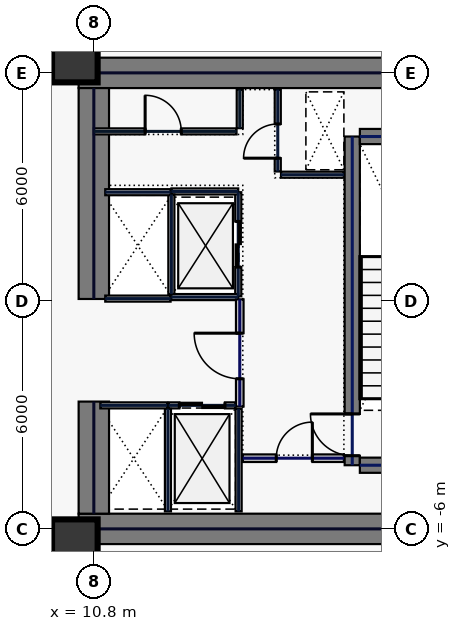
"""IFC4 building model, lengths in metres.
Left out: names, types, materials, properties, quantities, classifications, styles, units other than length and angle.
Written with IfcOpenShell. Run it as: python <this file> out.ifc"""

import sys

from ifc_helpers import new_model, si_unit, direction, frame, frame_2d, origin, origin_2d, place, context, subcontext, project, spatial, rectangle, hollow_rectangle, extrude, element, fill, save


model = new_model("IFC4")
c1 = context("Model", 3, precision=1e-05, world=origin(), true_north=direction((0.0, 1.0)))
c2 = subcontext(c1, "Body", "Model", "MODEL_VIEW")
j1 = project(units=[si_unit("LENGTHUNIT", "METRE"), si_unit("PLANEANGLEUNIT", "RADIAN")], contexts=[c1])
p1 = place(None, origin())
s1 = spatial("IfcSite", under=j1, at=p1, CompositionType="ELEMENT")
p2 = place(p1, origin())
s2 = spatial("IfcBuilding", under=s1, at=p2, CompositionType="ELEMENT")
p3 = place(p2, frame((0.0, 0.0, 51.4)))
s3 = spatial("IfcBuildingStorey", under=s2, at=p3, CompositionType="ELEMENT", Elevation=51.4)
for number, where, z_axis, x_axis in (
    (1, (10.4, 6.0, 0.0), (0.0, 0.0, 1.0), (1.0, 0.0, 0.0)),
    (2, (10.4, -6.0, 0.0), (0.0, 0.0, 1.0), (1.0, 0.0, 0.0)),
):
    element("IfcWall", number, at=place(p3, frame(where, z_axis=z_axis, x_axis=x_axis)), inside=s3, PredefinedType="SHEAR", context=c2, shape_type="SweptSolid", body=[
        extrude(rectangle(XDim=11.6, YDim=0.8, at=frame_2d((5.8, 0.0))), origin(), (0.0, 0.0, 1.0), 3.74),
    ])
p4 = place(p3, frame((10.8, -5.6, 0.0), z_axis=(0.0, 0.0, 1.0), x_axis=(0.0, 1.0, 0.0)))
e3 = element("IfcWall", 3, at=p4, inside=s3, PredefinedType="SHEAR", context=c2, shape_type="SweptSolid", body=[
    extrude(rectangle(XDim=2.95, YDim=0.8, at=frame_2d((1.475, 0.0))), origin(), (0.0, 0.0, 1.0), 3.74),
])
p5 = place(p3, frame((10.8, 0.05, 0.0), z_axis=(0.0, 0.0, 1.0), x_axis=(0.0, 1.0, 0.0)))
e4 = element("IfcWall", 4, at=p5, inside=s3, PredefinedType="SHEAR", context=c2, shape_type="SweptSolid", body=[
    extrude(rectangle(XDim=5.55, YDim=0.8, at=frame_2d((2.775, 0.0))), origin(), (0.0, 0.0, 1.0), 3.74),
])
p6 = place(p3, frame((17.6, -4.325, 0.0), z_axis=(0.0, 0.0, 1.0), x_axis=(0.0, 1.0, 0.0)))
e5 = element("IfcWall", 5, at=p6, inside=s3, PredefinedType="SHEAR", context=c2, shape_type="SweptSolid", body=[
    extrude(rectangle(XDim=8.65, YDim=0.4, at=frame_2d((4.325, 0.0))), origin(), (0.0, 0.0, 1.0), 3.74),
])
p7 = place(p6, frame((0.25, 0.0, 0.0)))
e6 = element("IfcOpeningElement", 6, at=p7, cuts=e5, PredefinedType="OPENING", context=c2, shape_type="SweptSolid", body=[
    extrude(rectangle(XDim=1.1, YDim=2.2, at=frame_2d((0.55, 1.1))), frame((0.0, 0.21, 0.0), z_axis=(0.0, -1.0, 0.0), x_axis=(1.0, 0.0, 0.0)), (0.0, 0.0, 1.0), 0.42),
])
for number, where, z_axis, x_axis in (
    (7, (17.8, -4.325, 0.0), (0.0, 0.0, 1.0), (1.0, 0.0, 0.0)),
    (8, (17.8, 4.325, 0.0), (0.0, 0.0, 1.0), (1.0, 0.0, 0.0)),
):
    element("IfcWall", number, at=place(p3, frame(where, z_axis=z_axis, x_axis=x_axis)), inside=s3, PredefinedType="SHEAR", context=c2, shape_type="SweptSolid", body=[
        extrude(rectangle(XDim=3.4, YDim=0.4, at=frame_2d((1.7, 0.0))), origin(), (0.0, 0.0, 1.0), 3.74),
    ])
for number, where, z_axis, x_axis in (
    (9, (10.3, -6.35, 0.0), (0.0, 0.0, 1.0), (1.0, 0.0, 0.0)),
    (10, (10.3, 6.35, 0.0), (0.0, 0.0, 1.0), (1.0, 0.0, 0.0)),
):
    element("IfcColumn", number, at=place(p3, frame(where, z_axis=z_axis, x_axis=x_axis)), inside=s3, PredefinedType="COLUMN", context=c2, shape_type="SweptSolid", body=[
        extrude(hollow_rectangle(XDim=1.2, YDim=1.2, WallThickness=0.05, at=origin_2d()), origin(), (0.0, 0.0, 1.0), 3.74),
    ])
p8 = place(p3, frame((14.6, 0.12, 0.0), z_axis=(0.0, 0.0, 1.0), x_axis=(0.0, 1.0, 0.0)))
e11 = element("IfcWall", 11, at=p8, inside=s3, PredefinedType="PARTITIONING", context=c2, shape_type="SweptSolid", body=[
    extrude(rectangle(XDim=2.74, YDim=0.16, at=frame_2d((1.37, 0.0))), origin(), (0.0, 0.0, 1.0), 3.74),
])
p9 = place(p8, frame((0.77, 0.0, 0.0)))
e12 = element("IfcOpeningElement", 12, at=p9, cuts=e11, PredefinedType="OPENING", context=c2, shape_type="SweptSolid", body=[
    extrude(rectangle(XDim=1.2, YDim=2.2, at=frame_2d((0.6, 1.1))), frame((0.0, 0.09, 0.0), z_axis=(0.0, -1.0, 0.0), x_axis=(1.0, 0.0, 0.0)), (0.0, 0.0, 1.0), 0.18),
])
for number, where, z_axis, x_axis in (
    (13, (12.84, 0.1, 0.0), (0.0, 0.0, 1.0), (1.0, 0.0, 0.0)),
    (14, (12.84, 2.88, 0.0), (0.0, 0.0, 1.0), (1.0, 0.0, 0.0)),
):
    element("IfcWall", number, at=place(p3, frame(where, z_axis=z_axis, x_axis=x_axis)), inside=s3, PredefinedType="PARTITIONING", context=c2, shape_type="SweptSolid", body=[
        extrude(rectangle(XDim=1.76, YDim=0.16, at=frame_2d((0.88, 0.0))), origin(), (0.0, 0.0, 1.0), 3.74),
    ])
p10 = place(p3, frame((12.84, 0.18, 0.0), z_axis=(0.0, 0.0, 1.0), x_axis=(0.0, 1.0, 0.0)))
e15 = element("IfcWall", 15, at=p10, inside=s3, PredefinedType="PARTITIONING", context=c2, shape_type="SweptSolid", body=[
    extrude(rectangle(XDim=2.62, YDim=0.16, at=frame_2d((1.31, 0.0))), origin(), (0.0, 0.0, 1.0), 3.74),
])
p11 = place(p3, frame((12.77, -2.75, 0.0), z_axis=(0.0, 0.0, 1.0), x_axis=(1.0, 0.0, 0.0)))
e16 = element("IfcWall", 16, at=p11, inside=s3, PredefinedType="PARTITIONING", context=c2, shape_type="SweptSolid", body=[
    extrude(rectangle(XDim=1.76, YDim=0.16, at=frame_2d((0.88, 0.0))), origin(), (0.0, 0.0, 1.0), 3.74),
])
p12 = place(p11, frame((0.28, 0.0, 0.0)))
e17 = element("IfcOpeningElement", 17, at=p12, cuts=e16, PredefinedType="OPENING", context=c2, shape_type="SweptSolid", body=[
    extrude(rectangle(XDim=1.2, YDim=2.2, at=frame_2d((0.6, 1.1))), frame((0.0, 0.09, 0.0), z_axis=(0.0, -1.0, 0.0), x_axis=(1.0, 0.0, 0.0)), (0.0, 0.0, 1.0), 0.18),
])
for number, where, z_axis, x_axis in (
    (18, (12.75, -5.54, 0.0), (0.0, 0.0, 1.0), (0.0, 1.0, 0.0)),
    (19, (14.61, -5.54, 0.0), (0.0, 0.0, 1.0), (0.0, 1.0, 0.0)),
):
    element("IfcWall", number, at=place(p3, frame(where, z_axis=z_axis, x_axis=x_axis)), inside=s3, PredefinedType="PARTITIONING", context=c2, shape_type="SweptSolid", body=[
        extrude(rectangle(XDim=2.7, YDim=0.16, at=frame_2d((1.35, 0.0))), origin(), (0.0, 0.0, 1.0), 3.74),
    ])
p13 = place(p3, frame((10.97, -2.75, 0.0), z_axis=(0.0, 0.0, 1.0), x_axis=(1.0, 0.0, 0.0)))
e20 = element("IfcWall", 20, at=p13, inside=s3, PredefinedType="PARTITIONING", context=c2, shape_type="SweptSolid", body=[
    extrude(rectangle(XDim=1.76, YDim=0.16, at=frame_2d((0.88, 0.0))), origin(), (0.0, 0.0, 1.0), 3.74),
])
for number, where, z_axis, x_axis in (
    (21, (11.1, 0.06, 0.0), (0.0, 0.0, 1.0), (1.0, 0.0, 0.0)),
    (22, (11.1, 2.86, 0.0), (0.0, 0.0, 1.0), (1.0, 0.0, 0.0)),
):
    element("IfcWall", number, at=place(p3, frame(where, z_axis=z_axis, x_axis=x_axis)), inside=s3, PredefinedType="PARTITIONING", context=c2, shape_type="SweptSolid", body=[
        extrude(rectangle(XDim=1.72, YDim=0.16, at=frame_2d((0.86, 0.0))), origin(), (0.0, 0.0, 1.0), 3.74),
    ])
p14 = place(p3, frame((15.64, 3.405, 0.0), z_axis=(0.0, 0.0, 1.0), x_axis=(0.0, 1.0, 0.0)))
e23 = element("IfcWall", 23, at=p14, inside=s3, PredefinedType="PARTITIONING", context=c2, shape_type="SweptSolid", body=[
    extrude(rectangle(XDim=2.155, YDim=0.16, at=frame_2d((1.078, 0.0))), origin(), (0.0, 0.0, 1.0), 3.74),
])
p15 = place(p14, frame((0.35, 0.0, 0.0)))
e24 = element("IfcOpeningElement", 24, at=p15, cuts=e23, PredefinedType="OPENING", context=c2, shape_type="SweptSolid", body=[
    extrude(rectangle(XDim=0.9, YDim=2.2, at=frame_2d((0.45, 1.1))), frame((0.0, 0.09, 0.0), z_axis=(0.0, -1.0, 0.0), x_axis=(1.0, 0.0, 0.0)), (0.0, 0.0, 1.0), 0.18),
])
p16 = place(p3, frame((15.725, 3.32, 0.0), z_axis=(0.0, 0.0, 1.0), x_axis=(1.0, 0.0, 0.0)))
e25 = element("IfcWall", 25, at=p16, inside=s3, PredefinedType="PARTITIONING", context=c2, shape_type="SweptSolid", body=[
    extrude(rectangle(XDim=1.655, YDim=0.16, at=frame_2d((0.827, 0.0))), origin(), (0.0, 0.0, 1.0), 3.74),
])
p17 = place(p3, frame((14.72, -4.14, 0.0), z_axis=(0.0, 0.0, 1.0), x_axis=(1.0, 0.0, 0.0)))
e26 = element("IfcWall", 26, at=p17, inside=s3, PredefinedType="SOLIDWALL", context=c2, shape_type="SweptSolid", body=[
    extrude(rectangle(XDim=2.66, YDim=0.2, at=frame_2d((1.33, 0.0))), origin(), (0.0, 0.0, 1.0), 3.74),
])
p18 = place(p17, frame((0.88, 0.0, 0.0)))
e27 = element("IfcOpeningElement", 27, at=p18, cuts=e26, PredefinedType="OPENING", context=c2, shape_type="SweptSolid", body=[
    extrude(rectangle(XDim=0.95, YDim=2.2, at=frame_2d((0.475, 1.1))), frame((0.0, 0.11, 0.0), z_axis=(0.0, -1.0, 0.0), x_axis=(1.0, 0.0, 0.0)), (0.0, 0.0, 1.0), 0.22),
])
p19 = place(p3, frame((10.8, 4.46, 0.0), z_axis=(0.0, 0.0, 1.0), x_axis=(1.0, 0.0, 0.0)))
e28 = element("IfcWall", 28, at=p19, inside=s3, PredefinedType="PARTITIONING", context=c2, shape_type="SweptSolid", body=[
    extrude(rectangle(XDim=3.755, YDim=0.16, at=frame_2d((1.877, 0.0))), origin(), (0.0, 0.0, 1.0), 3.74),
])
p20 = place(p19, frame((1.35, 0.0, 0.0)))
e29 = element("IfcOpeningElement", 29, at=p20, cuts=e28, PredefinedType="OPENING", context=c2, shape_type="SweptSolid", body=[
    extrude(rectangle(XDim=0.95, YDim=2.2, at=frame_2d((0.475, 1.1))), frame((0.0, 0.09, 0.0), z_axis=(0.0, -1.0, 0.0), x_axis=(1.0, 0.0, 0.0)), (0.0, 0.0, 1.0), 0.18),
])
p21 = place(p3, frame((14.64, 4.545, 0.0), z_axis=(0.0, 0.0, 1.0), x_axis=(0.0, 1.0, 0.0)))
e30 = element("IfcWall", 30, at=p21, inside=s3, PredefinedType="PARTITIONING", context=c2, shape_type="SweptSolid", body=[
    extrude(rectangle(XDim=1.015, YDim=0.16, at=frame_2d((0.508, 0.0))), origin(), (0.0, 0.0, 1.0), 3.74),
])
p22 = place(p3, frame((14.64, -2.78, 0.0), z_axis=(0.0, 0.0, 1.0), x_axis=(0.0, 1.0, 0.0)))
e31 = element("IfcWall", 31, at=p22, inside=s3, PredefinedType="SOLIDWALL", context=c2, shape_type="SweptSolid", body=[
    extrude(rectangle(XDim=2.82, YDim=0.2, at=frame_2d((1.41, 0.0))), origin(), (0.0, 0.0, 1.0), 3.74),
])
p23 = place(p22, frame((0.73, 0.0, 0.0)))
e32 = element("IfcOpeningElement", 32, at=p23, cuts=e31, PredefinedType="OPENING", context=c2, shape_type="SweptSolid", body=[
    extrude(rectangle(XDim=1.2, YDim=2.2, at=frame_2d((0.6, 1.1))), frame((0.0, 0.11, 0.0), z_axis=(0.0, -1.0, 0.0), x_axis=(1.0, 0.0, 0.0)), (0.0, 0.0, 1.0), 0.22),
])
p24 = place(p3, frame((10.58, 7.885, 0.0), z_axis=(0.0, 0.0, 1.0), x_axis=(0.0, -1.0, 0.0)))
e33 = element("IfcWall", 33, at=p24, inside=s3, PredefinedType="PARTITIONING", context=c2, shape_type="SweptSolid", body=[
    extrude(rectangle(XDim=1.465, YDim=0.16, at=frame_2d((0.732, 0.0))), origin(), (0.0, 0.0, 1.0), 3.74),
])
p25 = place(p3, frame((10.58, -6.42, 0.0), z_axis=(0.0, 0.0, 1.0), x_axis=(0.0, -1.0, 0.0)))
e34 = element("IfcWall", 34, at=p25, inside=s3, PredefinedType="PARTITIONING", context=c2, shape_type="SweptSolid", body=[
    extrude(rectangle(XDim=1.365, YDim=0.16, at=frame_2d((0.683, 0.0))), origin(), (0.0, 0.0, 1.0), 3.74),
])
p26 = place(p7, origin())
e35 = element("IfcDoor", 35, at=p26, inside=s3, OperationType="SINGLE_SWING_RIGHT", PredefinedType="DOOR", context=c2, shape_type="SweptSolid", body=[
    extrude(rectangle(XDim=1.1, YDim=2.2, at=frame_2d((0.55, 1.1))), frame((0.0, 0.025, 0.0), z_axis=(0.0, -1.0, 0.0), x_axis=(1.0, 0.0, 0.0)), (0.0, 0.0, 1.0), 0.05),
])
fill(e6, e35)
p27 = place(p9, origin())
e36 = element("IfcDoor", 36, at=p27, inside=s3, OperationType="SLIDING_TO_LEFT", PredefinedType="DOOR", context=c2, shape_type="SweptSolid", body=[
    extrude(rectangle(XDim=1.2, YDim=2.2, at=frame_2d((0.6, 1.1))), frame((0.0, 0.025, 0.0), z_axis=(0.0, -1.0, 0.0), x_axis=(1.0, 0.0, 0.0)), (0.0, 0.0, 1.0), 0.05),
])
fill(e12, e36)
p28 = place(p12, origin())
e37 = element("IfcDoor", 37, at=p28, inside=s3, OperationType="SLIDING_TO_LEFT", PredefinedType="DOOR", context=c2, shape_type="SweptSolid", body=[
    extrude(rectangle(XDim=1.2, YDim=2.2, at=frame_2d((0.6, 1.1))), frame((0.0, 0.025, 0.0), z_axis=(0.0, -1.0, 0.0), x_axis=(1.0, 0.0, 0.0)), (0.0, 0.0, 1.0), 0.05),
])
fill(e17, e37)
p29 = place(p15, origin())
e38 = element("IfcDoor", 38, at=p29, inside=s3, OperationType="SINGLE_SWING_LEFT", PredefinedType="DOOR", context=c2, shape_type="SweptSolid", body=[
    extrude(rectangle(XDim=0.9, YDim=2.2, at=frame_2d((0.45, 1.1))), frame((0.0, 0.025, 0.0), z_axis=(0.0, -1.0, 0.0), x_axis=(1.0, 0.0, 0.0)), (0.0, 0.0, 1.0), 0.05),
])
fill(e24, e38)
p30 = place(p18, origin())
e39 = element("IfcDoor", 39, at=p30, inside=s3, OperationType="SINGLE_SWING_RIGHT", PredefinedType="DOOR", context=c2, shape_type="SweptSolid", body=[
    extrude(rectangle(XDim=0.95, YDim=2.2, at=frame_2d((0.475, 1.1))), frame((0.0, 0.025, 0.0), z_axis=(0.0, -1.0, 0.0), x_axis=(1.0, 0.0, 0.0)), (0.0, 0.0, 1.0), 0.05),
])
fill(e27, e39)
p31 = place(p20, origin())
e40 = element("IfcDoor", 40, at=p31, inside=s3, OperationType="SINGLE_SWING_LEFT", PredefinedType="DOOR", context=c2, shape_type="SweptSolid", body=[
    extrude(rectangle(XDim=0.95, YDim=2.2, at=frame_2d((0.475, 1.1))), frame((0.0, 0.025, 0.0), z_axis=(0.0, -1.0, 0.0), x_axis=(1.0, 0.0, 0.0)), (0.0, 0.0, 1.0), 0.05),
])
fill(e29, e40)
p32 = place(p23, origin())
e41 = element("IfcDoor", 41, at=p32, inside=s3, OperationType="SINGLE_SWING_RIGHT", PredefinedType="DOOR", context=c2, shape_type="SweptSolid", body=[
    extrude(rectangle(XDim=1.2, YDim=2.2, at=frame_2d((0.6, 1.1))), frame((0.0, 0.025, 0.0), z_axis=(0.0, -1.0, 0.0), x_axis=(1.0, 0.0, 0.0)), (0.0, 0.0, 1.0), 0.05),
])
fill(e32, e41)
save(model, sys.argv[1])
